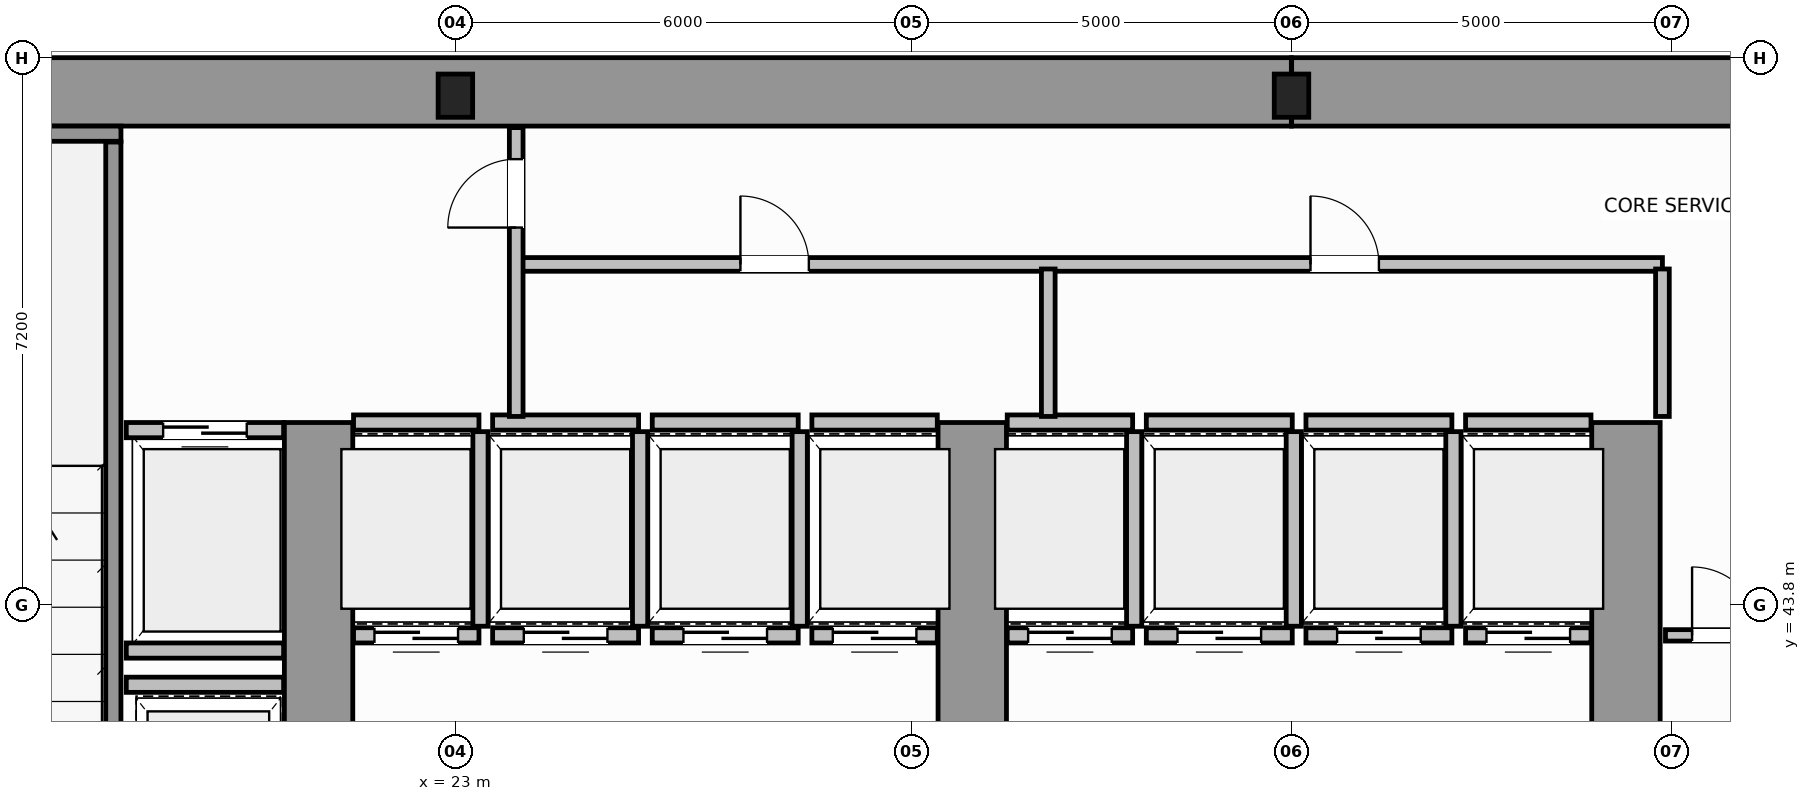
"""IFC4 building model, lengths in metres.
Left out: names, types, materials, properties, quantities, classifications, styles, units other than length and angle.
Written with IfcOpenShell. Run it as: python <this file> out.ifc"""

import sys

from ifc_helpers import new_model, si_unit, direction, frame, frame_2d, origin, origin_2d, place, context, subcontext, project, spatial, rectangle, i_section, extrude, source, transform, mapped, element, fill, save


model = new_model("IFC4")
c1 = context("Model", 3, precision=1e-05, world=origin(), true_north=direction((0.0, 1.0)))
c2 = subcontext(c1, "Body", "Model", "MODEL_VIEW")
j1 = project(units=[si_unit("LENGTHUNIT", "METRE"), si_unit("PLANEANGLEUNIT", "RADIAN")], contexts=[c1])
p1 = place(None, origin())
s1 = spatial("IfcSite", under=j1, at=p1, CompositionType="ELEMENT")
p2 = place(p1, origin())
s2 = spatial("IfcBuilding", under=s1, at=p2, CompositionType="ELEMENT")
p3 = place(p2, frame((0.0, 0.0, 14.4)))
s3 = spatial("IfcBuildingStorey", under=s2, at=p3, CompositionType="ELEMENT", Elevation=14.4)
m1 = source(origin(), c2, "Body", "SweptSolid", [
    extrude(i_section(OverallWidth=0.454, OverallDepth=0.569, WebThickness=0.078, FlangeThickness=0.08, FilletRadius=0.015, at=origin_2d()), origin(), (0.0, 0.0, 1.0), 4.4),
])
for number, where, z_axis, x_axis in (
    (1, (23.0, 50.5, 0.0), (0.0, 0.0, 1.0), (1.0, 0.0, 0.0)),
    (2, (34.0, 50.5, 0.0), (0.0, 0.0, 1.0), (1.0, 0.0, 0.0)),
):
    element("IfcColumn", number, at=place(p3, frame(where, z_axis=z_axis, x_axis=x_axis)), inside=s3, PredefinedType="COLUMN", context=c2, shape_type="MappedRepresentation", body=[
        mapped(m1, transform((0.0, 0.0, 0.0), scale=1.0)),
    ])
for number, where, z_axis, x_axis in (
    (3, (14.454, 50.55, 0.0), (0.0, 0.0, 1.0), (1.0, 0.0, 0.0)),
    (4, (34.002, 50.55, 0.0), (0.0, 0.0, 1.0), (1.0, 0.0, 0.0)),
):
    element("IfcWall", number, at=place(p3, frame(where, z_axis=z_axis, x_axis=x_axis)), inside=s3, PredefinedType="SHEAR", context=c2, shape_type="SweptSolid", body=[
        extrude(rectangle(XDim=19.544, YDim=0.9, at=frame_2d((9.772, 0.0))), origin(), (0.0, 0.0, 1.0), 4.4),
    ])
for number, where, z_axis, x_axis in (
    (5, (21.2, 36.97, 0.0), (0.0, 0.0, 1.0), (0.0, 1.0, 0.0)),
    (6, (29.8, 36.97, 0.0), (0.0, 0.0, 1.0), (0.0, 1.0, 0.0)),
    (7, (38.4, 36.97, 0.0), (0.0, 0.0, 1.0), (0.0, 1.0, 0.0)),
):
    element("IfcWall", number, at=place(p3, frame(where, z_axis=z_axis, x_axis=x_axis)), inside=s3, PredefinedType="SHEAR", context=c2, shape_type="SweptSolid", body=[
        extrude(rectangle(XDim=9.23, YDim=0.9, at=frame_2d((4.615, 0.0))), origin(), (0.0, 0.0, 1.0), 4.4),
    ])
p4 = place(p3, frame((14.45, 50.0, 0.0), z_axis=(0.0, 0.0, 1.0), x_axis=(1.0, 0.0, 0.0)))
e8 = element("IfcWall", 8, at=p4, inside=s3, PredefinedType="SOLIDWALL", context=c2, shape_type="SweptSolid", body=[
    extrude(rectangle(XDim=4.15, YDim=0.2, at=frame_2d((2.075, 0.0))), origin(), (0.0, 0.0, 1.0), 4.4),
])
p5 = place(p3, frame((18.5, 39.96, 0.0), z_axis=(0.0, 0.0, 1.0), x_axis=(0.0, 1.0, 0.0)))
e9 = element("IfcWall", 9, at=p5, inside=s3, PredefinedType="SOLIDWALL", context=c2, shape_type="SweptSolid", body=[
    extrude(rectangle(XDim=9.93, YDim=0.2, at=frame_2d((4.965, 0.0))), origin(), (0.0, 0.0, 1.0), 4.4),
])
p6 = place(p3, frame((21.66, 43.4, 0.0), z_axis=(0.0, 0.0, 1.0), x_axis=(1.0, 0.0, 0.0)))
e10 = element("IfcWall", 10, at=p6, inside=s3, PredefinedType="SOLIDWALL", context=c2, shape_type="SweptSolid", body=[
    extrude(rectangle(XDim=1.65, YDim=0.2, at=frame_2d((0.825, 0.0))), origin(), (0.0, 0.0, 1.0), 4.12),
])
p7 = place(p6, frame((0.275, 0.0, 0.0)))
e11 = element("IfcOpeningElement", 11, at=p7, cuts=e10, PredefinedType="OPENING", context=c2, shape_type="SweptSolid", body=[
    extrude(rectangle(XDim=1.1, YDim=2.15, at=frame_2d((0.55, 1.075))), frame((0.0, 0.11, 0.0), z_axis=(0.0, -1.0, 0.0), x_axis=(1.0, 0.0, 0.0)), (0.0, 0.0, 1.0), 0.22),
])
p8 = place(p3, frame((21.66, 46.2, 0.0), z_axis=(0.0, 0.0, 1.0), x_axis=(1.0, 0.0, 0.0)))
e12 = element("IfcWall", 12, at=p8, inside=s3, PredefinedType="SOLIDWALL", context=c2, shape_type="SweptSolid", body=[
    extrude(rectangle(XDim=1.65, YDim=0.2, at=frame_2d((0.825, 0.0))), origin(), (0.0, 0.0, 1.0), 4.12),
])
p9 = place(p3, frame((23.33, 43.52, 0.0), z_axis=(0.0, 0.0, 1.0), x_axis=(0.0, 1.0, 0.0)))
e13 = element("IfcWall", 13, at=p9, inside=s3, PredefinedType="SOLIDWALL", context=c2, shape_type="SweptSolid", body=[
    extrude(rectangle(XDim=2.56, YDim=0.2, at=frame_2d((1.28, 0.0))), origin(), (0.0, 0.0, 1.0), 2.91),
])
p10 = place(p3, frame((23.49, 43.4, 0.0), z_axis=(0.0, 0.0, 1.0), x_axis=(1.0, 0.0, 0.0)))
e14 = element("IfcWall", 14, at=p10, inside=s3, PredefinedType="SOLIDWALL", context=c2, shape_type="SweptSolid", body=[
    extrude(rectangle(XDim=1.92, YDim=0.2, at=frame_2d((0.96, 0.0))), origin(), (0.0, 0.0, 1.0), 4.12),
])
p11 = place(p10, frame((0.41, 0.0, 0.0)))
e15 = element("IfcOpeningElement", 15, at=p11, cuts=e14, PredefinedType="OPENING", context=c2, shape_type="SweptSolid", body=[
    extrude(rectangle(XDim=1.1, YDim=2.15, at=frame_2d((0.55, 1.075))), frame((0.0, 0.11, 0.0), z_axis=(0.0, -1.0, 0.0), x_axis=(1.0, 0.0, 0.0)), (0.0, 0.0, 1.0), 0.22),
])
p12 = place(p3, frame((23.49, 46.2, 0.0), z_axis=(0.0, 0.0, 1.0), x_axis=(1.0, 0.0, 0.0)))
e16 = element("IfcWall", 16, at=p12, inside=s3, PredefinedType="SOLIDWALL", context=c2, shape_type="SweptSolid", body=[
    extrude(rectangle(XDim=1.92, YDim=0.2, at=frame_2d((0.96, 0.0))), origin(), (0.0, 0.0, 1.0), 4.12),
])
p13 = place(p3, frame((25.43, 43.52, 0.0), z_axis=(0.0, 0.0, 1.0), x_axis=(0.0, 1.0, 0.0)))
e17 = element("IfcWall", 17, at=p13, inside=s3, PredefinedType="SOLIDWALL", context=c2, shape_type="SweptSolid", body=[
    extrude(rectangle(XDim=2.56, YDim=0.2, at=frame_2d((1.28, 0.0))), origin(), (0.0, 0.0, 1.0), 4.12),
])
p14 = place(p3, frame((25.59, 43.4, 0.0), z_axis=(0.0, 0.0, 1.0), x_axis=(1.0, 0.0, 0.0)))
e18 = element("IfcWall", 18, at=p14, inside=s3, PredefinedType="SOLIDWALL", context=c2, shape_type="SweptSolid", body=[
    extrude(rectangle(XDim=1.92, YDim=0.2, at=frame_2d((0.96, 0.0))), origin(), (0.0, 0.0, 1.0), 4.12),
])
p15 = place(p14, frame((0.41, 0.0, 0.0)))
e19 = element("IfcOpeningElement", 19, at=p15, cuts=e18, PredefinedType="OPENING", context=c2, shape_type="SweptSolid", body=[
    extrude(rectangle(XDim=1.1, YDim=2.15, at=frame_2d((0.55, 1.075))), frame((0.0, 0.11, 0.0), z_axis=(0.0, -1.0, 0.0), x_axis=(1.0, 0.0, 0.0)), (0.0, 0.0, 1.0), 0.22),
])
p16 = place(p3, frame((25.59, 46.2, 0.0), z_axis=(0.0, 0.0, 1.0), x_axis=(1.0, 0.0, 0.0)))
e20 = element("IfcWall", 20, at=p16, inside=s3, PredefinedType="SOLIDWALL", context=c2, shape_type="SweptSolid", body=[
    extrude(rectangle(XDim=1.92, YDim=0.2, at=frame_2d((0.96, 0.0))), origin(), (0.0, 0.0, 1.0), 4.12),
])
p17 = place(p3, frame((27.53, 43.52, 0.0), z_axis=(0.0, 0.0, 1.0), x_axis=(0.0, 1.0, 0.0)))
e21 = element("IfcWall", 21, at=p17, inside=s3, PredefinedType="SOLIDWALL", context=c2, shape_type="SweptSolid", body=[
    extrude(rectangle(XDim=2.56, YDim=0.2, at=frame_2d((1.28, 0.0))), origin(), (0.0, 0.0, 1.0), 4.12),
])
p18 = place(p3, frame((27.69, 43.4, 0.0), z_axis=(0.0, 0.0, 1.0), x_axis=(1.0, 0.0, 0.0)))
e22 = element("IfcWall", 22, at=p18, inside=s3, PredefinedType="SOLIDWALL", context=c2, shape_type="SweptSolid", body=[
    extrude(rectangle(XDim=1.65, YDim=0.2, at=frame_2d((0.825, 0.0))), origin(), (0.0, 0.0, 1.0), 4.12),
])
p19 = place(p18, frame((0.275, 0.0, 0.0)))
e23 = element("IfcOpeningElement", 23, at=p19, cuts=e22, PredefinedType="OPENING", context=c2, shape_type="SweptSolid", body=[
    extrude(rectangle(XDim=1.1, YDim=2.15, at=frame_2d((0.55, 1.075))), frame((0.0, 0.11, 0.0), z_axis=(0.0, -1.0, 0.0), x_axis=(1.0, 0.0, 0.0)), (0.0, 0.0, 1.0), 0.22),
])
p20 = place(p3, frame((27.69, 46.2, 0.0), z_axis=(0.0, 0.0, 1.0), x_axis=(1.0, 0.0, 0.0)))
e24 = element("IfcWall", 24, at=p20, inside=s3, PredefinedType="SOLIDWALL", context=c2, shape_type="SweptSolid", body=[
    extrude(rectangle(XDim=1.65, YDim=0.2, at=frame_2d((0.825, 0.0))), origin(), (0.0, 0.0, 1.0), 4.12),
])
p21 = place(p3, frame((30.26, 43.4, 0.0), z_axis=(0.0, 0.0, 1.0), x_axis=(1.0, 0.0, 0.0)))
e25 = element("IfcWall", 25, at=p21, inside=s3, PredefinedType="SOLIDWALL", context=c2, shape_type="SweptSolid", body=[
    extrude(rectangle(XDim=1.65, YDim=0.2, at=frame_2d((0.825, 0.0))), origin(), (0.0, 0.0, 1.0), 4.12),
])
p22 = place(p21, frame((0.275, 0.0, 0.0)))
e26 = element("IfcOpeningElement", 26, at=p22, cuts=e25, PredefinedType="OPENING", context=c2, shape_type="SweptSolid", body=[
    extrude(rectangle(XDim=1.1, YDim=2.15, at=frame_2d((0.55, 1.075))), frame((0.0, 0.11, 0.0), z_axis=(0.0, -1.0, 0.0), x_axis=(1.0, 0.0, 0.0)), (0.0, 0.0, 1.0), 0.22),
])
p23 = place(p3, frame((30.26, 46.2, 0.0), z_axis=(0.0, 0.0, 1.0), x_axis=(1.0, 0.0, 0.0)))
e27 = element("IfcWall", 27, at=p23, inside=s3, PredefinedType="SOLIDWALL", context=c2, shape_type="SweptSolid", body=[
    extrude(rectangle(XDim=1.65, YDim=0.2, at=frame_2d((0.825, 0.0))), origin(), (0.0, 0.0, 1.0), 4.12),
])
p24 = place(p3, frame((31.93, 43.52, 0.0), z_axis=(0.0, 0.0, 1.0), x_axis=(0.0, 1.0, 0.0)))
e28 = element("IfcWall", 28, at=p24, inside=s3, PredefinedType="SOLIDWALL", context=c2, shape_type="SweptSolid", body=[
    extrude(rectangle(XDim=2.56, YDim=0.2, at=frame_2d((1.28, 0.0))), origin(), (0.0, 0.0, 1.0), 4.12),
])
p25 = place(p3, frame((32.09, 43.4, 0.0), z_axis=(0.0, 0.0, 1.0), x_axis=(1.0, 0.0, 0.0)))
e29 = element("IfcWall", 29, at=p25, inside=s3, PredefinedType="SOLIDWALL", context=c2, shape_type="SweptSolid", body=[
    extrude(rectangle(XDim=1.92, YDim=0.2, at=frame_2d((0.96, 0.0))), origin(), (0.0, 0.0, 1.0), 4.12),
])
p26 = place(p25, frame((0.41, 0.0, 0.0)))
e30 = element("IfcOpeningElement", 30, at=p26, cuts=e29, PredefinedType="OPENING", context=c2, shape_type="SweptSolid", body=[
    extrude(rectangle(XDim=1.1, YDim=2.15, at=frame_2d((0.55, 1.075))), frame((0.0, 0.11, 0.0), z_axis=(0.0, -1.0, 0.0), x_axis=(1.0, 0.0, 0.0)), (0.0, 0.0, 1.0), 0.22),
])
p27 = place(p3, frame((32.09, 46.2, 0.0), z_axis=(0.0, 0.0, 1.0), x_axis=(1.0, 0.0, 0.0)))
e31 = element("IfcWall", 31, at=p27, inside=s3, PredefinedType="SOLIDWALL", context=c2, shape_type="SweptSolid", body=[
    extrude(rectangle(XDim=1.92, YDim=0.2, at=frame_2d((0.96, 0.0))), origin(), (0.0, 0.0, 1.0), 4.12),
])
p28 = place(p3, frame((34.03, 43.52, 0.0), z_axis=(0.0, 0.0, 1.0), x_axis=(0.0, 1.0, 0.0)))
e32 = element("IfcWall", 32, at=p28, inside=s3, PredefinedType="SOLIDWALL", context=c2, shape_type="SweptSolid", body=[
    extrude(rectangle(XDim=2.56, YDim=0.2, at=frame_2d((1.28, 0.0))), origin(), (0.0, 0.0, 1.0), 4.12),
])
p29 = place(p3, frame((34.19, 43.4, 0.0), z_axis=(0.0, 0.0, 1.0), x_axis=(1.0, 0.0, 0.0)))
e33 = element("IfcWall", 33, at=p29, inside=s3, PredefinedType="SOLIDWALL", context=c2, shape_type="SweptSolid", body=[
    extrude(rectangle(XDim=1.92, YDim=0.2, at=frame_2d((0.96, 0.0))), origin(), (0.0, 0.0, 1.0), 4.12),
])
p30 = place(p29, frame((0.41, 0.0, 0.0)))
e34 = element("IfcOpeningElement", 34, at=p30, cuts=e33, PredefinedType="OPENING", context=c2, shape_type="SweptSolid", body=[
    extrude(rectangle(XDim=1.1, YDim=2.15, at=frame_2d((0.55, 1.075))), frame((0.0, 0.11, 0.0), z_axis=(0.0, -1.0, 0.0), x_axis=(1.0, 0.0, 0.0)), (0.0, 0.0, 1.0), 0.22),
])
p31 = place(p3, frame((34.19, 46.2, 0.0), z_axis=(0.0, 0.0, 1.0), x_axis=(1.0, 0.0, 0.0)))
e35 = element("IfcWall", 35, at=p31, inside=s3, PredefinedType="SOLIDWALL", context=c2, shape_type="SweptSolid", body=[
    extrude(rectangle(XDim=1.92, YDim=0.2, at=frame_2d((0.96, 0.0))), origin(), (0.0, 0.0, 1.0), 4.12),
])
p32 = place(p3, frame((36.13, 43.52, 0.0), z_axis=(0.0, 0.0, 1.0), x_axis=(0.0, 1.0, 0.0)))
e36 = element("IfcWall", 36, at=p32, inside=s3, PredefinedType="SOLIDWALL", context=c2, shape_type="SweptSolid", body=[
    extrude(rectangle(XDim=2.56, YDim=0.2, at=frame_2d((1.28, 0.0))), origin(), (0.0, 0.0, 1.0), 4.12),
])
p33 = place(p3, frame((36.29, 43.4, 0.0), z_axis=(0.0, 0.0, 1.0), x_axis=(1.0, 0.0, 0.0)))
e37 = element("IfcWall", 37, at=p33, inside=s3, PredefinedType="SOLIDWALL", context=c2, shape_type="SweptSolid", body=[
    extrude(rectangle(XDim=1.65, YDim=0.2, at=frame_2d((0.825, 0.0))), origin(), (0.0, 0.0, 1.0), 4.12),
])
p34 = place(p33, frame((0.275, 0.0, 0.0)))
e38 = element("IfcOpeningElement", 38, at=p34, cuts=e37, PredefinedType="OPENING", context=c2, shape_type="SweptSolid", body=[
    extrude(rectangle(XDim=1.1, YDim=2.15, at=frame_2d((0.55, 1.075))), frame((0.0, 0.11, 0.0), z_axis=(0.0, -1.0, 0.0), x_axis=(1.0, 0.0, 0.0)), (0.0, 0.0, 1.0), 0.22),
])
p35 = place(p3, frame((36.29, 46.2, 0.0), z_axis=(0.0, 0.0, 1.0), x_axis=(1.0, 0.0, 0.0)))
e39 = element("IfcWall", 39, at=p35, inside=s3, PredefinedType="SOLIDWALL", context=c2, shape_type="SweptSolid", body=[
    extrude(rectangle(XDim=1.65, YDim=0.2, at=frame_2d((0.825, 0.0))), origin(), (0.0, 0.0, 1.0), 4.12),
])
p36 = place(p3, frame((18.67, 46.1, 0.0), z_axis=(0.0, 0.0, 1.0), x_axis=(1.0, 0.0, 0.0)))
e40 = element("IfcWall", 40, at=p36, inside=s3, PredefinedType="SOLIDWALL", context=c2, shape_type="SweptSolid", body=[
    extrude(rectangle(XDim=2.07, YDim=0.2, at=frame_2d((1.035, 0.0))), origin(), (0.0, 0.0, 1.0), 4.12),
])
p37 = place(p36, frame((0.485, 0.0, 0.0)))
e41 = element("IfcOpeningElement", 41, at=p37, cuts=e40, PredefinedType="OPENING", context=c2, shape_type="SweptSolid", body=[
    extrude(rectangle(XDim=1.1, YDim=2.15, at=frame_2d((0.55, 1.075))), frame((0.0, 0.11, 0.0), z_axis=(0.0, -1.0, 0.0), x_axis=(1.0, 0.0, 0.0)), (0.0, 0.0, 1.0), 0.22),
])
for number, where, z_axis, x_axis in (
    (42, (18.67, 43.2, 0.0), (0.0, 0.0, 1.0), (1.0, 0.0, 0.0)),
    (43, (18.67, 42.75, 0.0), (0.0, 0.0, 1.0), (1.0, 0.0, 0.0)),
):
    element("IfcWall", number, at=place(p3, frame(where, z_axis=z_axis, x_axis=x_axis)), inside=s3, PredefinedType="SOLIDWALL", context=c2, shape_type="SweptSolid", body=[
        extrude(rectangle(XDim=2.07, YDim=0.2, at=frame_2d((1.035, 0.0))), origin(), (0.0, 0.0, 1.0), 4.12),
    ])
p38 = place(p3, frame((38.92, 43.4, 0.0), z_axis=(0.0, 0.0, 1.0), x_axis=(1.0, 0.0, 0.0)))
e44 = element("IfcWall", 44, at=p38, inside=s3, PredefinedType="PARTITIONING", context=c2, shape_type="SweptSolid", body=[
    extrude(rectangle(XDim=1.6, YDim=0.15, at=frame_2d((0.8, 0.0))), origin(), (0.0, 0.0, 1.0), 4.12),
])
p39 = place(p38, frame((0.35, 0.0, 0.0)))
e45 = element("IfcOpeningElement", 45, at=p39, cuts=e44, PredefinedType="OPENING", context=c2, shape_type="SweptSolid", body=[
    extrude(rectangle(XDim=0.9, YDim=2.1, at=frame_2d((0.45, 1.05))), frame((0.0, 0.085, 0.0), z_axis=(0.0, -1.0, 0.0), x_axis=(1.0, 0.0, 0.0)), (0.0, 0.0, 1.0), 0.17),
])
p40 = place(p3, frame((23.85, 48.28, 0.0), z_axis=(0.0, 0.0, 1.0), x_axis=(1.0, 0.0, 0.0)))
e46 = element("IfcWall", 46, at=p40, inside=s3, PredefinedType="PLUMBINGWALL", context=c2, shape_type="SweptSolid", body=[
    extrude(rectangle(XDim=15.03, YDim=0.18, at=frame_2d((7.515, 0.0))), origin(), (0.0, 0.0, 1.0), 4.12),
])
p41 = place(p40, frame((2.9, 0.0, 0.0)))
e47 = element("IfcOpeningElement", 47, at=p41, cuts=e46, PredefinedType="OPENING", context=c2, shape_type="SweptSolid", body=[
    extrude(rectangle(XDim=0.9, YDim=2.15, at=frame_2d((0.45, 1.075))), frame((0.0, 0.1, 0.0), z_axis=(0.0, -1.0, 0.0), x_axis=(1.0, 0.0, 0.0)), (0.0, 0.0, 1.0), 0.2),
])
p42 = place(p40, frame((10.4, 0.0, 0.0)))
e48 = element("IfcOpeningElement", 48, at=p42, cuts=e46, PredefinedType="OPENING", context=c2, shape_type="SweptSolid", body=[
    extrude(rectangle(XDim=0.9, YDim=2.15, at=frame_2d((0.45, 1.075))), frame((0.0, 0.1, 0.0), z_axis=(0.0, -1.0, 0.0), x_axis=(1.0, 0.0, 0.0)), (0.0, 0.0, 1.0), 0.2),
])
p43 = place(p3, frame((23.8, 46.28, 0.0), z_axis=(0.0, 0.0, 1.0), x_axis=(0.0, 1.0, 0.0)))
e49 = element("IfcWall", 49, at=p43, inside=s3, PredefinedType="PLUMBINGWALL", context=c2, shape_type="SweptSolid", body=[
    extrude(rectangle(XDim=3.8, YDim=0.18, at=frame_2d((1.9, 0.0))), origin(), (0.0, 0.0, 1.0), 4.12),
])
p44 = place(p43, frame((2.485, 0.0, 0.0)))
e50 = element("IfcOpeningElement", 50, at=p44, cuts=e49, PredefinedType="OPENING", context=c2, shape_type="SweptSolid", body=[
    extrude(rectangle(XDim=0.9, YDim=2.15, at=frame_2d((0.45, 1.075))), frame((0.0, 0.1, 0.0), z_axis=(0.0, -1.0, 0.0), x_axis=(1.0, 0.0, 0.0)), (0.0, 0.0, 1.0), 0.2),
])
for number, where, z_axis, x_axis in (
    (51, (30.8, 46.28, 0.0), (0.0, 0.0, 1.0), (0.0, 1.0, 0.0)),
    (52, (38.88, 46.28, 0.0), (0.0, 0.0, 1.0), (0.0, 1.0, 0.0)),
):
    element("IfcWall", number, at=place(p3, frame(where, z_axis=z_axis, x_axis=x_axis)), inside=s3, PredefinedType="PLUMBINGWALL", context=c2, shape_type="SweptSolid", body=[
        extrude(rectangle(XDim=1.94, YDim=0.18, at=frame_2d((0.97, 0.0))), origin(), (0.0, 0.0, 1.0), 4.12),
    ])
m2 = source(origin(), c2, "Body", "SweptSolid", [
    extrude(rectangle(XDim=1.1, YDim=2.15, at=frame_2d((0.55, 1.075))), frame((0.0, 0.025, 0.0), z_axis=(0.0, -1.0, 0.0), x_axis=(1.0, 0.0, 0.0)), (0.0, 0.0, 1.0), 0.05),
])
p45 = place(p7, origin())
e53 = element("IfcDoor", 53, at=p45, inside=s3, OperationType="DOUBLE_DOOR_SLIDING", PredefinedType="DOOR", context=c2, shape_type="MappedRepresentation", body=[
    mapped(m2, transform((0.0, 0.0, 0.0), scale=1.0)),
])
fill(e11, e53)
p46 = place(p11, origin())
e54 = element("IfcDoor", 54, at=p46, inside=s3, OperationType="DOUBLE_DOOR_SLIDING", PredefinedType="DOOR", context=c2, shape_type="MappedRepresentation", body=[
    mapped(m2, transform((0.0, 0.0, 0.0), scale=1.0)),
])
fill(e15, e54)
p47 = place(p15, origin())
e55 = element("IfcDoor", 55, at=p47, inside=s3, OperationType="DOUBLE_DOOR_SLIDING", PredefinedType="DOOR", context=c2, shape_type="MappedRepresentation", body=[
    mapped(m2, transform((0.0, 0.0, 0.0), scale=1.0)),
])
fill(e19, e55)
p48 = place(p19, origin())
e56 = element("IfcDoor", 56, at=p48, inside=s3, OperationType="DOUBLE_DOOR_SLIDING", PredefinedType="DOOR", context=c2, shape_type="MappedRepresentation", body=[
    mapped(m2, transform((0.0, 0.0, 0.0), scale=1.0)),
])
fill(e23, e56)
p49 = place(p22, origin())
e57 = element("IfcDoor", 57, at=p49, inside=s3, OperationType="DOUBLE_DOOR_SLIDING", PredefinedType="DOOR", context=c2, shape_type="MappedRepresentation", body=[
    mapped(m2, transform((0.0, 0.0, 0.0), scale=1.0)),
])
fill(e26, e57)
p50 = place(p26, origin())
e58 = element("IfcDoor", 58, at=p50, inside=s3, OperationType="DOUBLE_DOOR_SLIDING", PredefinedType="DOOR", context=c2, shape_type="MappedRepresentation", body=[
    mapped(m2, transform((0.0, 0.0, 0.0), scale=1.0)),
])
fill(e30, e58)
p51 = place(p30, origin())
e59 = element("IfcDoor", 59, at=p51, inside=s3, OperationType="DOUBLE_DOOR_SLIDING", PredefinedType="DOOR", context=c2, shape_type="MappedRepresentation", body=[
    mapped(m2, transform((0.0, 0.0, 0.0), scale=1.0)),
])
fill(e34, e59)
p52 = place(p34, origin())
e60 = element("IfcDoor", 60, at=p52, inside=s3, OperationType="DOUBLE_DOOR_SLIDING", PredefinedType="DOOR", context=c2, shape_type="MappedRepresentation", body=[
    mapped(m2, transform((0.0, 0.0, 0.0), scale=1.0)),
])
fill(e38, e60)
p53 = place(p37, origin())
e61 = element("IfcDoor", 61, at=p53, inside=s3, OperationType="DOUBLE_DOOR_SLIDING", PredefinedType="DOOR", context=c2, shape_type="MappedRepresentation", body=[
    mapped(m2, transform((0.0, 0.0, 0.0), scale=1.0)),
])
fill(e41, e61)
m3 = source(origin(), c2, "Body", "SweptSolid", [
    extrude(rectangle(XDim=0.9, YDim=2.1, at=frame_2d((0.45, 1.05))), frame((0.0, 0.025, 0.0), z_axis=(0.0, -1.0, 0.0), x_axis=(1.0, 0.0, 0.0)), (0.0, 0.0, 1.0), 0.05),
])
p54 = place(p39, origin())
e62 = element("IfcDoor", 62, at=p54, inside=s3, OperationType="SINGLE_SWING_LEFT", PredefinedType="DOOR", context=c2, shape_type="MappedRepresentation", body=[
    mapped(m3, transform((0.0, 0.0, 0.0), scale=1.0)),
])
fill(e45, e62)
m4 = source(origin(), c2, "Body", "SweptSolid", [
    extrude(rectangle(XDim=0.9, YDim=2.15, at=frame_2d((0.45, 1.075))), frame((0.0, 0.025, 0.0), z_axis=(0.0, -1.0, 0.0), x_axis=(1.0, 0.0, 0.0)), (0.0, 0.0, 1.0), 0.05),
])
p55 = place(p44, origin())
e63 = element("IfcDoor", 63, at=p55, inside=s3, OperationType="SINGLE_SWING_LEFT", PredefinedType="DOOR", context=c2, shape_type="MappedRepresentation", body=[
    mapped(m4, transform((0.0, 0.0, 0.0), scale=1.0)),
])
fill(e50, e63)
p56 = place(p41, origin())
e64 = element("IfcDoor", 64, at=p56, inside=s3, OperationType="SINGLE_SWING_RIGHT", PredefinedType="DOOR", context=c2, shape_type="MappedRepresentation", body=[
    mapped(m4, transform((0.0, 0.0, 0.0), scale=1.0)),
])
fill(e47, e64)
p57 = place(p42, origin())
e65 = element("IfcDoor", 65, at=p57, inside=s3, OperationType="SINGLE_SWING_LEFT", PredefinedType="DOOR", context=c2, shape_type="MappedRepresentation", body=[
    mapped(m4, transform((0.0, 0.0, 0.0), scale=1.0)),
])
fill(e48, e65)
save(model, sys.argv[1])
